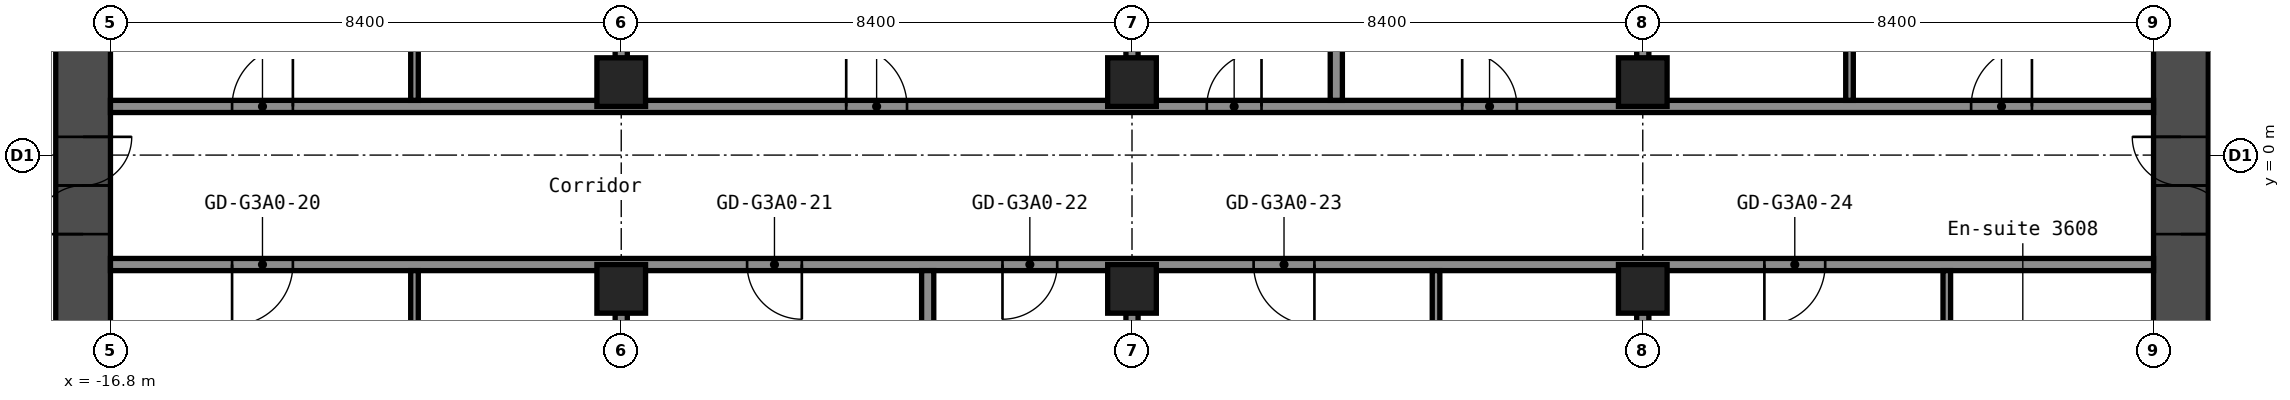
"""IFC4 building model, lengths in metres.
Left out: names, types, materials, properties, quantities, classifications, styles, units other than length and angle.
Written with IfcOpenShell. Run it as: python <this file> out.ifc"""

import sys

from ifc_helpers import new_model, si_unit, direction, frame, frame_2d, origin, origin_2d, place, context, subcontext, project, spatial, rectangle, hollow_rectangle, extrude, element, fill, save


model = new_model("IFC4")
c1 = context("Model", 3, precision=1e-05, world=origin(), true_north=direction((0.0, 1.0)))
c2 = subcontext(c1, "Body", "Model", "MODEL_VIEW")
j1 = project(units=[si_unit("LENGTHUNIT", "METRE"), si_unit("PLANEANGLEUNIT", "RADIAN")], contexts=[c1])
p1 = place(None, origin())
s1 = spatial("IfcSite", under=j1, at=p1, CompositionType="ELEMENT")
p2 = place(p1, origin())
s2 = spatial("IfcBuilding", under=s1, at=p2, CompositionType="ELEMENT")
p3 = place(p2, frame((0.0, 0.0, 131.0)))
s3 = spatial("IfcBuildingStorey", under=s2, at=p3, CompositionType="ELEMENT", Elevation=131.0)
for number, where, z_axis, x_axis in (
    (1, (-8.4, -2.2, 0.0), (0.0, 0.0, 1.0), (1.0, 0.0, 0.0)),
    (2, (-8.4, 1.2, 0.0), (0.0, 0.0, 1.0), (1.0, 0.0, 0.0)),
    (3, (0.0, -2.2, 0.0), (0.0, 0.0, 1.0), (1.0, 0.0, 0.0)),
    (4, (0.0, 1.2, 0.0), (0.0, 0.0, 1.0), (1.0, 0.0, 0.0)),
    (5, (8.4, -2.2, 0.0), (0.0, 0.0, 1.0), (1.0, 0.0, 0.0)),
    (6, (8.4, 1.2, 0.0), (0.0, 0.0, 1.0), (1.0, 0.0, 0.0)),
):
    element("IfcColumn", number, at=place(p3, frame(where, z_axis=z_axis, x_axis=x_axis)), inside=s3, PredefinedType="COLUMN", context=c2, shape_type="SweptSolid", body=[
        extrude(hollow_rectangle(XDim=0.8, YDim=0.8, WallThickness=0.032, at=origin_2d()), origin(), (0.0, 0.0, 1.0), 2.75),
    ])
p4 = place(p3, frame((-17.25, -8.4, 0.0), z_axis=(0.0, 0.0, 1.0), x_axis=(0.0, 1.0, 0.0)))
e7 = element("IfcWall", 7, at=p4, inside=s3, PredefinedType="SHEAR", context=c2, shape_type="SweptSolid", body=[
    extrude(rectangle(XDim=16.8, YDim=0.9, at=frame_2d((8.4, 0.0))), origin(), (0.0, 0.0, 1.0), 2.75),
])
p5 = place(p4, frame((7.1, 0.0, 0.0)))
e8 = element("IfcOpeningElement", 8, at=p5, cuts=e7, PredefinedType="OPENING", context=c2, shape_type="SweptSolid", body=[
    extrude(rectangle(XDim=1.6, YDim=2.1, at=frame_2d((0.8, 1.05))), frame((0.0, 0.46, 0.0), z_axis=(0.0, -1.0, 0.0), x_axis=(1.0, 0.0, 0.0)), (0.0, 0.0, 1.0), 0.92),
])
p6 = place(p3, frame((17.25, -8.4, 0.0), z_axis=(0.0, 0.0, 1.0), x_axis=(0.0, 1.0, 0.0)))
e9 = element("IfcWall", 9, at=p6, inside=s3, PredefinedType="SHEAR", context=c2, shape_type="SweptSolid", body=[
    extrude(rectangle(XDim=16.8, YDim=0.9, at=frame_2d((8.4, 0.0))), origin(), (0.0, 0.0, 1.0), 2.75),
])
p7 = place(p6, frame((7.1, 0.0, 0.0)))
e10 = element("IfcOpeningElement", 10, at=p7, cuts=e9, PredefinedType="OPENING", context=c2, shape_type="SweptSolid", body=[
    extrude(rectangle(XDim=1.6, YDim=2.1, at=frame_2d((0.8, 1.05))), frame((0.0, 0.46, 0.0), z_axis=(0.0, -1.0, 0.0), x_axis=(1.0, 0.0, 0.0)), (0.0, 0.0, 1.0), 0.92),
])
p8 = place(p3, frame((-16.8, -1.8, 0.0), z_axis=(0.0, 0.0, 1.0), x_axis=(1.0, 0.0, 0.0)))
e11 = element("IfcWall", 11, at=p8, inside=s3, PredefinedType="PARTITIONING", context=c2, shape_type="SweptSolid", body=[
    extrude(rectangle(XDim=33.6, YDim=0.2, at=frame_2d((16.8, 0.0))), origin(), (0.0, 0.0, 1.0), 2.75),
])
p9 = place(p8, frame((2.0, 0.0, 0.0)))
e12 = element("IfcOpeningElement", 12, at=p9, cuts=e11, PredefinedType="OPENING", context=c2, shape_type="SweptSolid", body=[
    extrude(rectangle(XDim=1.0, YDim=2.1, at=frame_2d((0.5, 1.05))), frame((0.0, 0.11, 0.0), z_axis=(0.0, -1.0, 0.0), x_axis=(1.0, 0.0, 0.0)), (0.0, 0.0, 1.0), 0.22),
])
p10 = place(p8, frame((10.47, 0.0, 0.0)))
e13 = element("IfcOpeningElement", 13, at=p10, cuts=e11, PredefinedType="OPENING", context=c2, shape_type="SweptSolid", body=[
    extrude(rectangle(XDim=0.9, YDim=2.1, at=frame_2d((0.45, 1.05))), frame((0.0, 0.11, 0.0), z_axis=(0.0, -1.0, 0.0), x_axis=(1.0, 0.0, 0.0)), (0.0, 0.0, 1.0), 0.22),
])
p11 = place(p8, frame((14.67, 0.0, 0.0)))
e14 = element("IfcOpeningElement", 14, at=p11, cuts=e11, PredefinedType="OPENING", context=c2, shape_type="SweptSolid", body=[
    extrude(rectangle(XDim=0.9, YDim=2.1, at=frame_2d((0.45, 1.05))), frame((0.0, 0.11, 0.0), z_axis=(0.0, -1.0, 0.0), x_axis=(1.0, 0.0, 0.0)), (0.0, 0.0, 1.0), 0.22),
])
p12 = place(p8, frame((18.8, 0.0, 0.0)))
e15 = element("IfcOpeningElement", 15, at=p12, cuts=e11, PredefinedType="OPENING", context=c2, shape_type="SweptSolid", body=[
    extrude(rectangle(XDim=1.0, YDim=2.1, at=frame_2d((0.5, 1.05))), frame((0.0, 0.11, 0.0), z_axis=(0.0, -1.0, 0.0), x_axis=(1.0, 0.0, 0.0)), (0.0, 0.0, 1.0), 0.22),
])
p13 = place(p8, frame((27.2, 0.0, 0.0)))
e16 = element("IfcOpeningElement", 16, at=p13, cuts=e11, PredefinedType="OPENING", context=c2, shape_type="SweptSolid", body=[
    extrude(rectangle(XDim=1.0, YDim=2.1, at=frame_2d((0.5, 1.05))), frame((0.0, 0.11, 0.0), z_axis=(0.0, -1.0, 0.0), x_axis=(1.0, 0.0, 0.0)), (0.0, 0.0, 1.0), 0.22),
])
p14 = place(p3, frame((-16.8, 0.8, 0.0), z_axis=(0.0, 0.0, 1.0), x_axis=(1.0, 0.0, 0.0)))
e17 = element("IfcWall", 17, at=p14, inside=s3, PredefinedType="PARTITIONING", context=c2, shape_type="SweptSolid", body=[
    extrude(rectangle(XDim=33.6, YDim=0.2, at=frame_2d((16.8, 0.0))), origin(), (0.0, 0.0, 1.0), 2.75),
])
p15 = place(p14, frame((2.0, 0.0, 0.0)))
e18 = element("IfcOpeningElement", 18, at=p15, cuts=e17, PredefinedType="OPENING", context=c2, shape_type="SweptSolid", body=[
    extrude(rectangle(XDim=1.0, YDim=2.1, at=frame_2d((0.5, 1.05))), frame((0.0, 0.11, 0.0), z_axis=(0.0, -1.0, 0.0), x_axis=(1.0, 0.0, 0.0)), (0.0, 0.0, 1.0), 0.22),
])
p16 = place(p14, frame((12.1, 0.0, 0.0)))
e19 = element("IfcOpeningElement", 19, at=p16, cuts=e17, PredefinedType="OPENING", context=c2, shape_type="SweptSolid", body=[
    extrude(rectangle(XDim=1.0, YDim=2.1, at=frame_2d((0.5, 1.05))), frame((0.0, 0.11, 0.0), z_axis=(0.0, -1.0, 0.0), x_axis=(1.0, 0.0, 0.0)), (0.0, 0.0, 1.0), 0.22),
])
p17 = place(p14, frame((18.03, 0.0, 0.0)))
e20 = element("IfcOpeningElement", 20, at=p17, cuts=e17, PredefinedType="OPENING", context=c2, shape_type="SweptSolid", body=[
    extrude(rectangle(XDim=0.9, YDim=2.1, at=frame_2d((0.45, 1.05))), frame((0.0, 0.11, 0.0), z_axis=(0.0, -1.0, 0.0), x_axis=(1.0, 0.0, 0.0)), (0.0, 0.0, 1.0), 0.22),
])
p18 = place(p14, frame((22.23, 0.0, 0.0)))
e21 = element("IfcOpeningElement", 21, at=p18, cuts=e17, PredefinedType="OPENING", context=c2, shape_type="SweptSolid", body=[
    extrude(rectangle(XDim=0.9, YDim=2.1, at=frame_2d((0.45, 1.05))), frame((0.0, 0.11, 0.0), z_axis=(0.0, -1.0, 0.0), x_axis=(1.0, 0.0, 0.0)), (0.0, 0.0, 1.0), 0.22),
])
p19 = place(p14, frame((30.6, 0.0, 0.0)))
e22 = element("IfcOpeningElement", 22, at=p19, cuts=e17, PredefinedType="OPENING", context=c2, shape_type="SweptSolid", body=[
    extrude(rectangle(XDim=1.0, YDim=2.1, at=frame_2d((0.5, 1.05))), frame((0.0, 0.11, 0.0), z_axis=(0.0, -1.0, 0.0), x_axis=(1.0, 0.0, 0.0)), (0.0, 0.0, 1.0), 0.22),
])
for number, where, z_axis, x_axis in (
    (23, (-11.8, -5.2, 0.0), (0.0, 0.0, 1.0), (0.0, 1.0, 0.0)),
    (24, (-11.8, 0.9, 0.0), (0.0, 0.0, 1.0), (0.0, 1.0, 0.0)),
):
    element("IfcWall", number, at=place(p3, frame(where, z_axis=z_axis, x_axis=x_axis)), inside=s3, PredefinedType="PARTITIONING", context=c2, shape_type="SweptSolid", body=[
        extrude(rectangle(XDim=3.3, YDim=0.125, at=frame_2d((1.65, 0.0))), origin(), (0.0, 0.0, 1.0), 2.75),
    ])
for number, where, z_axis, x_axis in (
    (25, (-8.4, -19.3, 0.0), (0.0, 0.0, 1.0), (0.0, 1.0, 0.0)),
    (26, (-8.4, 1.59, 0.0), (0.0, 0.0, 1.0), (0.0, 1.0, 0.0)),
):
    element("IfcWall", number, at=place(p3, frame(where, z_axis=z_axis, x_axis=x_axis)), inside=s3, PredefinedType="PARTITIONING", context=c2, shape_type="SweptSolid", body=[
        extrude(rectangle(XDim=16.71, YDim=0.2, at=frame_2d((8.355, 0.0))), origin(), (0.0, 0.0, 1.0), 2.75),
    ])
p20 = place(p3, frame((-3.36, -19.3, 0.0), z_axis=(0.0, 0.0, 1.0), x_axis=(0.0, 1.0, 0.0)))
e27 = element("IfcWall", 27, at=p20, inside=s3, PredefinedType="PARTITIONING", context=c2, shape_type="SweptSolid", body=[
    extrude(rectangle(XDim=17.4, YDim=0.2, at=frame_2d((8.7, 0.0))), origin(), (0.0, 0.0, 1.0), 2.75),
])
for number, where, z_axis, x_axis in (
    (28, (0.0, -19.3, 0.0), (0.0, 0.0, 1.0), (0.0, 1.0, 0.0)),
    (29, (0.0, 1.59, 0.0), (0.0, 0.0, 1.0), (0.0, 1.0, 0.0)),
):
    element("IfcWall", number, at=place(p3, frame(where, z_axis=z_axis, x_axis=x_axis)), inside=s3, PredefinedType="PARTITIONING", context=c2, shape_type="SweptSolid", body=[
        extrude(rectangle(XDim=16.71, YDim=0.2, at=frame_2d((8.355, 0.0))), origin(), (0.0, 0.0, 1.0), 2.75),
    ])
p21 = place(p3, frame((3.36, 0.9, 0.0), z_axis=(0.0, 0.0, 1.0), x_axis=(0.0, 1.0, 0.0)))
e30 = element("IfcWall", 30, at=p21, inside=s3, PredefinedType="PARTITIONING", context=c2, shape_type="SweptSolid", body=[
    extrude(rectangle(XDim=17.4, YDim=0.2, at=frame_2d((8.7, 0.0))), origin(), (0.0, 0.0, 1.0), 2.75),
])
p22 = place(p3, frame((5.0, -5.2, 0.0), z_axis=(0.0, 0.0, 1.0), x_axis=(0.0, 1.0, 0.0)))
e31 = element("IfcWall", 31, at=p22, inside=s3, PredefinedType="PARTITIONING", context=c2, shape_type="SweptSolid", body=[
    extrude(rectangle(XDim=3.3, YDim=0.125, at=frame_2d((1.65, 0.0))), origin(), (0.0, 0.0, 1.0), 2.75),
])
for number, where, z_axis, x_axis in (
    (32, (8.4, -19.3, 0.0), (0.0, 0.0, 1.0), (0.0, 1.0, 0.0)),
    (33, (8.4, 1.59, 0.0), (0.0, 0.0, 1.0), (0.0, 1.0, 0.0)),
):
    element("IfcWall", number, at=place(p3, frame(where, z_axis=z_axis, x_axis=x_axis)), inside=s3, PredefinedType="PARTITIONING", context=c2, shape_type="SweptSolid", body=[
        extrude(rectangle(XDim=16.71, YDim=0.2, at=frame_2d((8.355, 0.0))), origin(), (0.0, 0.0, 1.0), 2.75),
    ])
for number, where, z_axis, x_axis in (
    (34, (11.8, 0.9, 0.0), (0.0, 0.0, 1.0), (0.0, 1.0, 0.0)),
    (35, (13.4, -5.2, 0.0), (0.0, 0.0, 1.0), (0.0, 1.0, 0.0)),
):
    element("IfcWall", number, at=place(p3, frame(where, z_axis=z_axis, x_axis=x_axis)), inside=s3, PredefinedType="PARTITIONING", context=c2, shape_type="SweptSolid", body=[
        extrude(rectangle(XDim=3.3, YDim=0.125, at=frame_2d((1.65, 0.0))), origin(), (0.0, 0.0, 1.0), 2.75),
    ])
p23 = place(p5, origin())
e36 = element("IfcDoor", 36, at=p23, inside=s3, OperationType="DOUBLE_DOOR_SINGLE_SWING", PredefinedType="DOOR", context=c2, shape_type="SweptSolid", body=[
    extrude(rectangle(XDim=1.6, YDim=2.1, at=frame_2d((0.8, 1.05))), frame((0.0, 0.025, 0.0), z_axis=(0.0, -1.0, 0.0), x_axis=(1.0, 0.0, 0.0)), (0.0, 0.0, 1.0), 0.05),
])
fill(e8, e36)
p24 = place(p7, origin())
e37 = element("IfcDoor", 37, at=p24, inside=s3, OperationType="DOUBLE_DOOR_SINGLE_SWING", PredefinedType="DOOR", context=c2, shape_type="SweptSolid", body=[
    extrude(rectangle(XDim=1.6, YDim=2.1, at=frame_2d((0.8, 1.05))), frame((0.0, 0.025, 0.0), z_axis=(0.0, -1.0, 0.0), x_axis=(1.0, 0.0, 0.0)), (0.0, 0.0, 1.0), 0.05),
])
fill(e10, e37)
p25 = place(p9, origin())
e38 = element("IfcDoor", 38, at=p25, inside=s3, OperationType="SINGLE_SWING_LEFT", PredefinedType="DOOR", context=c2, shape_type="SweptSolid", body=[
    extrude(rectangle(XDim=1.0, YDim=2.1, at=frame_2d((0.5, 1.05))), frame((0.0, 0.025, 0.0), z_axis=(0.0, -1.0, 0.0), x_axis=(1.0, 0.0, 0.0)), (0.0, 0.0, 1.0), 0.05),
])
fill(e12, e38)
p26 = place(p10, origin())
e39 = element("IfcDoor", 39, at=p26, inside=s3, OperationType="SINGLE_SWING_RIGHT", PredefinedType="DOOR", context=c2, shape_type="SweptSolid", body=[
    extrude(rectangle(XDim=0.9, YDim=2.1, at=frame_2d((0.45, 1.05))), frame((0.0, 0.025, 0.0), z_axis=(0.0, -1.0, 0.0), x_axis=(1.0, 0.0, 0.0)), (0.0, 0.0, 1.0), 0.05),
])
fill(e13, e39)
p27 = place(p11, origin())
e40 = element("IfcDoor", 40, at=p27, inside=s3, OperationType="SINGLE_SWING_LEFT", PredefinedType="DOOR", context=c2, shape_type="SweptSolid", body=[
    extrude(rectangle(XDim=0.9, YDim=2.1, at=frame_2d((0.45, 1.05))), frame((0.0, 0.025, 0.0), z_axis=(0.0, -1.0, 0.0), x_axis=(1.0, 0.0, 0.0)), (0.0, 0.0, 1.0), 0.05),
])
fill(e14, e40)
p28 = place(p12, origin())
e41 = element("IfcDoor", 41, at=p28, inside=s3, OperationType="SINGLE_SWING_RIGHT", PredefinedType="DOOR", context=c2, shape_type="SweptSolid", body=[
    extrude(rectangle(XDim=1.0, YDim=2.1, at=frame_2d((0.5, 1.05))), frame((0.0, 0.025, 0.0), z_axis=(0.0, -1.0, 0.0), x_axis=(1.0, 0.0, 0.0)), (0.0, 0.0, 1.0), 0.05),
])
fill(e15, e41)
p29 = place(p13, origin())
e42 = element("IfcDoor", 42, at=p29, inside=s3, OperationType="SINGLE_SWING_LEFT", PredefinedType="DOOR", context=c2, shape_type="SweptSolid", body=[
    extrude(rectangle(XDim=1.0, YDim=2.1, at=frame_2d((0.5, 1.05))), frame((0.0, 0.025, 0.0), z_axis=(0.0, -1.0, 0.0), x_axis=(1.0, 0.0, 0.0)), (0.0, 0.0, 1.0), 0.05),
])
fill(e16, e42)
p30 = place(p15, origin())
e43 = element("IfcDoor", 43, at=p30, inside=s3, OperationType="SINGLE_SWING_LEFT", PredefinedType="DOOR", context=c2, shape_type="SweptSolid", body=[
    extrude(rectangle(XDim=1.0, YDim=2.1, at=frame_2d((0.5, 1.05))), frame((0.0, 0.025, 0.0), z_axis=(0.0, -1.0, 0.0), x_axis=(1.0, 0.0, 0.0)), (0.0, 0.0, 1.0), 0.05),
])
fill(e18, e43)
p31 = place(p16, origin())
e44 = element("IfcDoor", 44, at=p31, inside=s3, OperationType="SINGLE_SWING_RIGHT", PredefinedType="DOOR", context=c2, shape_type="SweptSolid", body=[
    extrude(rectangle(XDim=1.0, YDim=2.1, at=frame_2d((0.5, 1.05))), frame((0.0, 0.025, 0.0), z_axis=(0.0, -1.0, 0.0), x_axis=(1.0, 0.0, 0.0)), (0.0, 0.0, 1.0), 0.05),
])
fill(e19, e44)
p32 = place(p17, origin())
e45 = element("IfcDoor", 45, at=p32, inside=s3, OperationType="SINGLE_SWING_LEFT", PredefinedType="DOOR", context=c2, shape_type="SweptSolid", body=[
    extrude(rectangle(XDim=0.9, YDim=2.1, at=frame_2d((0.45, 1.05))), frame((0.0, 0.025, 0.0), z_axis=(0.0, -1.0, 0.0), x_axis=(1.0, 0.0, 0.0)), (0.0, 0.0, 1.0), 0.05),
])
fill(e20, e45)
p33 = place(p18, origin())
e46 = element("IfcDoor", 46, at=p33, inside=s3, OperationType="SINGLE_SWING_RIGHT", PredefinedType="DOOR", context=c2, shape_type="SweptSolid", body=[
    extrude(rectangle(XDim=0.9, YDim=2.1, at=frame_2d((0.45, 1.05))), frame((0.0, 0.025, 0.0), z_axis=(0.0, -1.0, 0.0), x_axis=(1.0, 0.0, 0.0)), (0.0, 0.0, 1.0), 0.05),
])
fill(e21, e46)
p34 = place(p19, origin())
e47 = element("IfcDoor", 47, at=p34, inside=s3, OperationType="SINGLE_SWING_LEFT", PredefinedType="DOOR", context=c2, shape_type="SweptSolid", body=[
    extrude(rectangle(XDim=1.0, YDim=2.1, at=frame_2d((0.5, 1.05))), frame((0.0, 0.025, 0.0), z_axis=(0.0, -1.0, 0.0), x_axis=(1.0, 0.0, 0.0)), (0.0, 0.0, 1.0), 0.05),
])
fill(e22, e47)
save(model, sys.argv[1])
